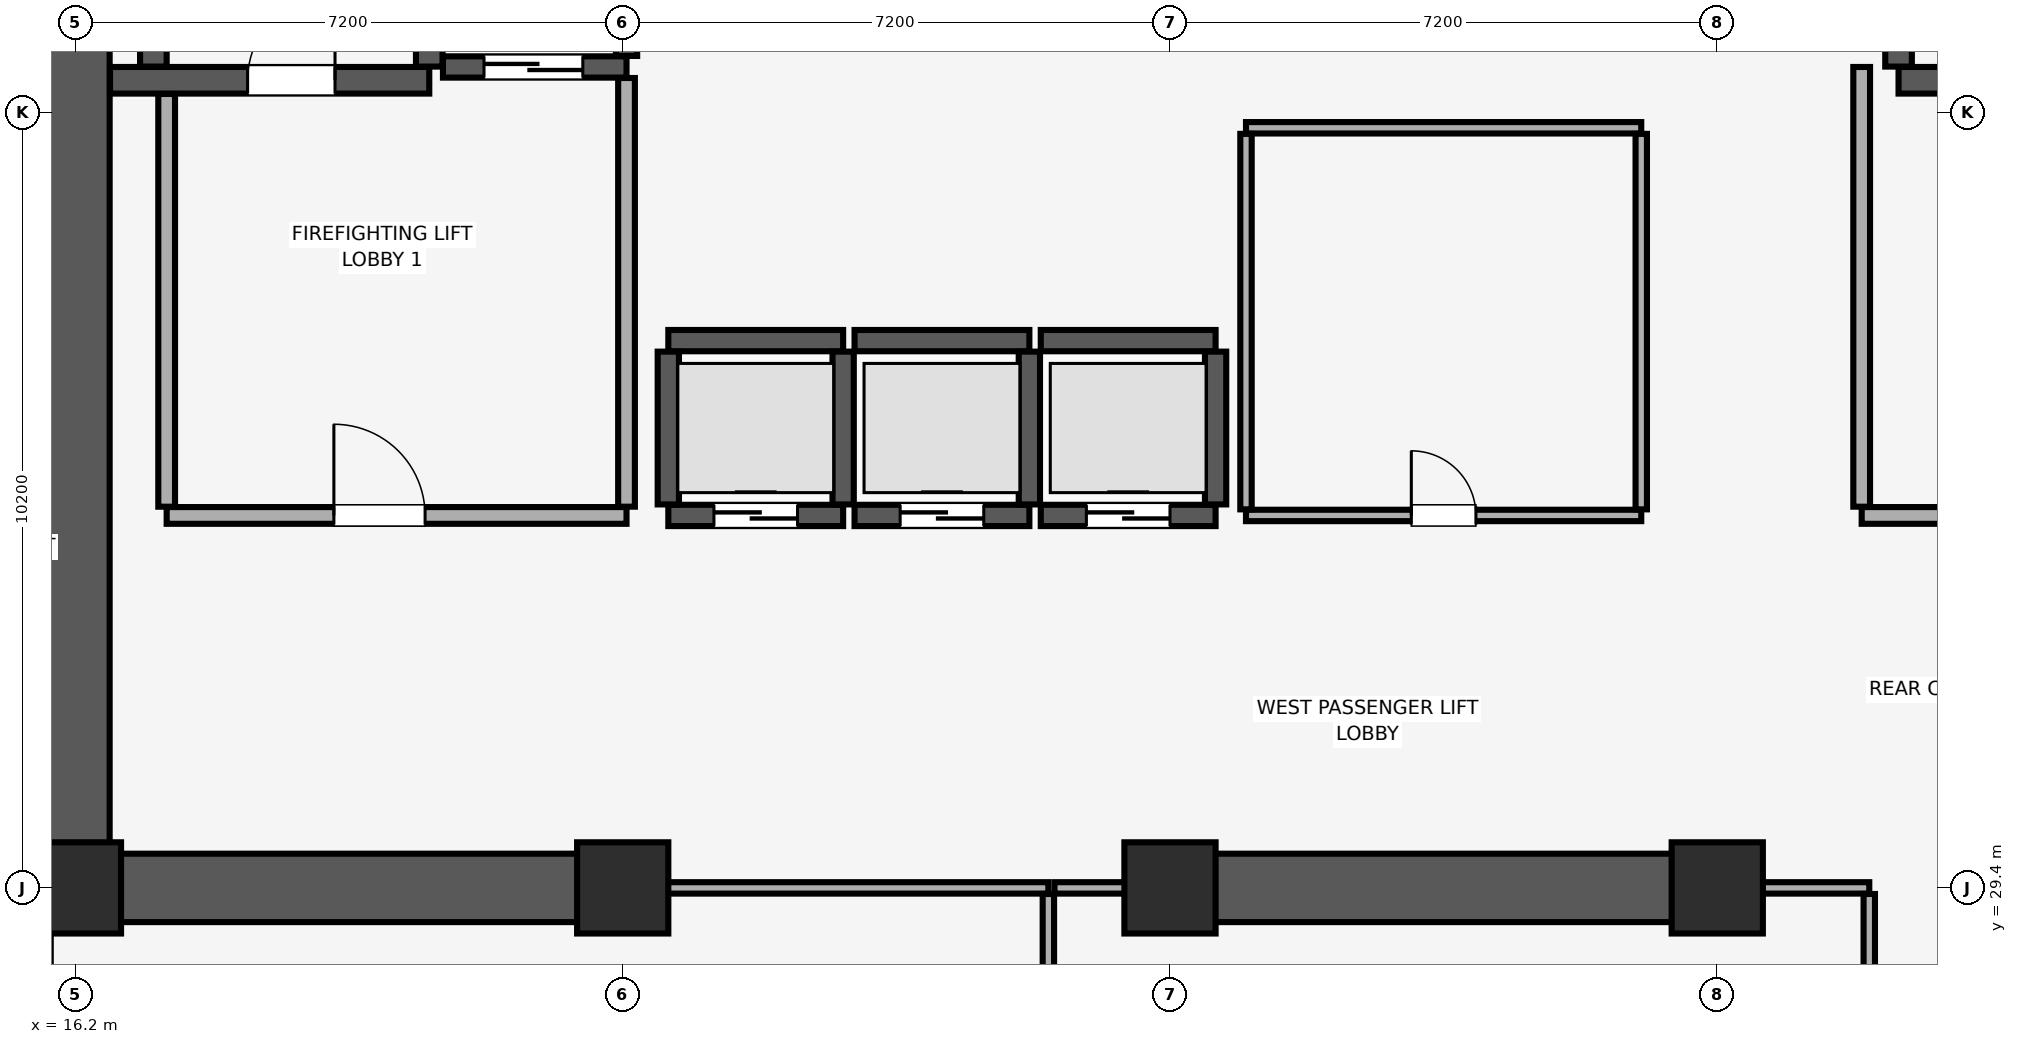
"""IFC4 building model, lengths in metres.
Left out: names, types, materials, properties, quantities, classifications, styles, units other than length and angle.
Written with IfcOpenShell. Run it as: python <this file> out.ifc"""

import sys

from ifc_helpers import new_model, si_unit, direction, frame, frame_2d, origin, origin_2d, place, context, subcontext, project, spatial, rectangle, extrude, element, fill, save


model = new_model("IFC4")
c1 = context("Model", 3, precision=1e-05, world=origin(), true_north=direction((0.0, 1.0)))
c2 = subcontext(c1, "Body", "Model", "MODEL_VIEW")
j1 = project(units=[si_unit("LENGTHUNIT", "METRE"), si_unit("PLANEANGLEUNIT", "RADIAN")], contexts=[c1])
p1 = place(None, origin())
s1 = spatial("IfcSite", under=j1, at=p1, CompositionType="ELEMENT")
p2 = place(p1, origin())
s2 = spatial("IfcBuilding", under=s1, at=p2, CompositionType="ELEMENT")
p3 = place(p2, frame((0.0, 0.0, 104.3)))
s3 = spatial("IfcBuildingStorey", under=s2, at=p3, CompositionType="ELEMENT", Elevation=104.3)
for number, where, z_axis, x_axis in (
    (1, (16.2, 29.4, 0.0), (0.0, 0.0, 1.0), (1.0, 0.0, 0.0)),
    (2, (23.4, 29.4, 0.0), (0.0, 0.0, 1.0), (1.0, 0.0, 0.0)),
    (3, (30.6, 29.4, 0.0), (0.0, 0.0, 1.0), (1.0, 0.0, 0.0)),
    (4, (37.8, 29.4, 0.0), (0.0, 0.0, 1.0), (1.0, 0.0, 0.0)),
):
    element("IfcColumn", number, at=place(p3, frame(where, z_axis=z_axis, x_axis=x_axis)), inside=s3, PredefinedType="COLUMN", context=c2, shape_type="SweptSolid", body=[
        extrude(rectangle(XDim=1.2, YDim=1.2, at=origin_2d()), origin(), (0.0, 0.0, 1.0), 3.51),
    ])
p4 = place(p3, frame((16.2, 29.4, 0.0), z_axis=(0.0, 0.0, 1.0), x_axis=(0.0, 1.0, 0.0)))
e5 = element("IfcWall", 5, at=p4, inside=s3, PredefinedType="SHEAR", context=c2, shape_type="SweptSolid", body=[
    extrude(rectangle(XDim=19.2, YDim=0.9, at=frame_2d((9.6, 0.0))), origin(), (0.0, 0.0, 1.0), 3.51),
])
p5 = place(p3, frame((16.655, 29.4, 0.0), z_axis=(0.0, 0.0, 1.0), x_axis=(1.0, 0.0, 0.0)))
e6 = element("IfcWall", 6, at=p5, inside=s3, PredefinedType="SHEAR", context=c2, shape_type="SweptSolid", body=[
    extrude(rectangle(XDim=6.945, YDim=0.9, at=frame_2d((3.473, 0.0))), origin(), (0.0, 0.0, 1.0), 3.51),
])
p6 = place(p3, frame((30.4, 29.4, 0.0), z_axis=(0.0, 0.0, 1.0), x_axis=(1.0, 0.0, 0.0)))
e7 = element("IfcWall", 7, at=p6, inside=s3, PredefinedType="SHEAR", context=c2, shape_type="SweptSolid", body=[
    extrude(rectangle(XDim=7.6, YDim=0.9, at=frame_2d((3.8, 0.0))), origin(), (0.0, 0.0, 1.0), 3.51),
])
p7 = place(p3, frame((16.655, 40.025, 0.0), z_axis=(0.0, 0.0, 1.0), x_axis=(1.0, 0.0, 0.0)))
e8 = element("IfcWall", 8, at=p7, inside=s3, PredefinedType="SHEAR", context=c2, shape_type="SweptSolid", body=[
    extrude(rectangle(XDim=4.2, YDim=0.35, at=frame_2d((2.1, 0.0))), origin(), (0.0, 0.0, 1.0), 3.51),
])
p8 = place(p7, frame((1.81, 0.0, 0.0)))
e9 = element("IfcOpeningElement", 9, at=p8, cuts=e8, PredefinedType="OPENING", context=c2, shape_type="SweptSolid", body=[
    extrude(rectangle(XDim=1.15, YDim=2.15, at=frame_2d((0.575, 1.075))), frame((0.0, 0.185, 0.0), z_axis=(0.0, -1.0, 0.0), x_axis=(1.0, 0.0, 0.0)), (0.0, 0.0, 1.0), 0.37),
])
for number, where, z_axis, x_axis in (
    (10, (17.225, 40.205, 0.0), (0.0, 0.0, 1.0), (0.0, 1.0, 0.0)),
    (11, (20.855, 40.205, 0.0), (0.0, 0.0, 1.0), (0.0, 1.0, 0.0)),
):
    element("IfcWall", number, at=place(p3, frame(where, z_axis=z_axis, x_axis=x_axis)), inside=s3, PredefinedType="SHEAR", context=c2, shape_type="SweptSolid", body=[
        extrude(rectangle(XDim=8.09, YDim=0.35, at=frame_2d((4.045, 0.0))), origin(), (0.0, 0.0, 1.0), 3.51),
    ])
p9 = place(p3, frame((40.185, 40.025, 0.0), z_axis=(0.0, 0.0, 1.0), x_axis=(1.0, 0.0, 0.0)))
e12 = element("IfcWall", 12, at=p9, inside=s3, PredefinedType="SHEAR", context=c2, shape_type="SweptSolid", body=[
    extrude(rectangle(XDim=3.63, YDim=0.35, at=frame_2d((1.815, 0.0))), origin(), (0.0, 0.0, 1.0), 3.51),
])
p10 = place(p9, frame((1.24, 0.0, 0.0)))
e13 = element("IfcOpeningElement", 13, at=p10, cuts=e12, PredefinedType="OPENING", context=c2, shape_type="SweptSolid", body=[
    extrude(rectangle(XDim=1.15, YDim=2.15, at=frame_2d((0.575, 1.075))), frame((0.0, 0.185, 0.0), z_axis=(0.0, -1.0, 0.0), x_axis=(1.0, 0.0, 0.0)), (0.0, 0.0, 1.0), 0.37),
])
p11 = place(p3, frame((40.185, 40.205, 0.0), z_axis=(0.0, 0.0, 1.0), x_axis=(0.0, 1.0, 0.0)))
e14 = element("IfcWall", 14, at=p11, inside=s3, PredefinedType="SHEAR", context=c2, shape_type="SweptSolid", body=[
    extrude(rectangle(XDim=8.09, YDim=0.35, at=frame_2d((4.045, 0.0))), origin(), (0.0, 0.0, 1.0), 3.51),
])
p12 = place(p3, frame((24.0, 34.3, 0.0), z_axis=(0.0, 0.0, 1.0), x_axis=(1.0, 0.0, 0.0)))
e15 = element("IfcWall", 15, at=p12, inside=s3, PredefinedType="SHEAR", context=c2, shape_type="SweptSolid", body=[
    extrude(rectangle(XDim=2.3, YDim=0.28, at=frame_2d((1.15, 0.0))), origin(), (0.0, 0.0, 1.0), 3.51),
])
p13 = place(p12, frame((0.6, 0.0, 0.0)))
e16 = element("IfcOpeningElement", 16, at=p13, cuts=e15, PredefinedType="OPENING", context=c2, shape_type="SweptSolid", body=[
    extrude(rectangle(XDim=1.1, YDim=2.2, at=frame_2d((0.55, 1.1))), frame((0.0, 0.15, 0.0), z_axis=(0.0, -1.0, 0.0), x_axis=(1.0, 0.0, 0.0)), (0.0, 0.0, 1.0), 0.3),
])
p14 = place(p3, frame((24.0, 36.6, 0.0), z_axis=(0.0, 0.0, 1.0), x_axis=(1.0, 0.0, 0.0)))
e17 = element("IfcWall", 17, at=p14, inside=s3, PredefinedType="SHEAR", context=c2, shape_type="SweptSolid", body=[
    extrude(rectangle(XDim=2.3, YDim=0.28, at=frame_2d((1.15, 0.0))), origin(), (0.0, 0.0, 1.0), 3.51),
])
for number, where, z_axis, x_axis in (
    (18, (24.0, 34.445, 0.0), (0.0, 0.0, 1.0), (0.0, 1.0, 0.0)),
    (19, (26.3, 34.445, 0.0), (0.0, 0.0, 1.0), (0.0, 1.0, 0.0)),
):
    element("IfcWall", number, at=place(p3, frame(where, z_axis=z_axis, x_axis=x_axis)), inside=s3, PredefinedType="SHEAR", context=c2, shape_type="SweptSolid", body=[
        extrude(rectangle(XDim=2.01, YDim=0.28, at=frame_2d((1.005, 0.0))), origin(), (0.0, 0.0, 1.0), 3.51),
    ])
p15 = place(p3, frame((26.45, 34.3, 0.0), z_axis=(0.0, 0.0, 1.0), x_axis=(1.0, 0.0, 0.0)))
e20 = element("IfcWall", 20, at=p15, inside=s3, PredefinedType="SHEAR", context=c2, shape_type="SweptSolid", body=[
    extrude(rectangle(XDim=2.3, YDim=0.28, at=frame_2d((1.15, 0.0))), origin(), (0.0, 0.0, 1.0), 3.51),
])
p16 = place(p15, frame((0.6, 0.0, 0.0)))
e21 = element("IfcOpeningElement", 21, at=p16, cuts=e20, PredefinedType="OPENING", context=c2, shape_type="SweptSolid", body=[
    extrude(rectangle(XDim=1.1, YDim=2.2, at=frame_2d((0.55, 1.1))), frame((0.0, 0.15, 0.0), z_axis=(0.0, -1.0, 0.0), x_axis=(1.0, 0.0, 0.0)), (0.0, 0.0, 1.0), 0.3),
])
p17 = place(p3, frame((26.45, 36.6, 0.0), z_axis=(0.0, 0.0, 1.0), x_axis=(1.0, 0.0, 0.0)))
e22 = element("IfcWall", 22, at=p17, inside=s3, PredefinedType="SHEAR", context=c2, shape_type="SweptSolid", body=[
    extrude(rectangle(XDim=2.3, YDim=0.28, at=frame_2d((1.15, 0.0))), origin(), (0.0, 0.0, 1.0), 3.51),
])
p18 = place(p3, frame((28.75, 34.445, 0.0), z_axis=(0.0, 0.0, 1.0), x_axis=(0.0, 1.0, 0.0)))
e23 = element("IfcWall", 23, at=p18, inside=s3, PredefinedType="SHEAR", context=c2, shape_type="SweptSolid", body=[
    extrude(rectangle(XDim=2.01, YDim=0.28, at=frame_2d((1.005, 0.0))), origin(), (0.0, 0.0, 1.0), 3.51),
])
p19 = place(p3, frame((28.9, 34.3, 0.0), z_axis=(0.0, 0.0, 1.0), x_axis=(1.0, 0.0, 0.0)))
e24 = element("IfcWall", 24, at=p19, inside=s3, PredefinedType="SHEAR", context=c2, shape_type="SweptSolid", body=[
    extrude(rectangle(XDim=2.3, YDim=0.28, at=frame_2d((1.15, 0.0))), origin(), (0.0, 0.0, 1.0), 3.51),
])
p20 = place(p19, frame((0.6, 0.0, 0.0)))
e25 = element("IfcOpeningElement", 25, at=p20, cuts=e24, PredefinedType="OPENING", context=c2, shape_type="SweptSolid", body=[
    extrude(rectangle(XDim=1.1, YDim=2.2, at=frame_2d((0.55, 1.1))), frame((0.0, 0.15, 0.0), z_axis=(0.0, -1.0, 0.0), x_axis=(1.0, 0.0, 0.0)), (0.0, 0.0, 1.0), 0.3),
])
p21 = place(p3, frame((28.9, 36.6, 0.0), z_axis=(0.0, 0.0, 1.0), x_axis=(1.0, 0.0, 0.0)))
e26 = element("IfcWall", 26, at=p21, inside=s3, PredefinedType="SHEAR", context=c2, shape_type="SweptSolid", body=[
    extrude(rectangle(XDim=2.3, YDim=0.28, at=frame_2d((1.15, 0.0))), origin(), (0.0, 0.0, 1.0), 3.51),
])
p22 = place(p3, frame((31.2, 34.445, 0.0), z_axis=(0.0, 0.0, 1.0), x_axis=(0.0, 1.0, 0.0)))
e27 = element("IfcWall", 27, at=p22, inside=s3, PredefinedType="SHEAR", context=c2, shape_type="SweptSolid", body=[
    extrude(rectangle(XDim=2.01, YDim=0.28, at=frame_2d((1.005, 0.0))), origin(), (0.0, 0.0, 1.0), 3.51),
])
p23 = place(p3, frame((21.035, 40.2, 0.0), z_axis=(0.0, 0.0, 1.0), x_axis=(1.0, 0.0, 0.0)))
e28 = element("IfcWall", 28, at=p23, inside=s3, PredefinedType="SHEAR", context=c2, shape_type="SweptSolid", body=[
    extrude(rectangle(XDim=2.415, YDim=0.28, at=frame_2d((1.208, 0.0))), origin(), (0.0, 0.0, 1.0), 3.51),
])
p24 = place(p23, frame((0.54, 0.0, 0.0)))
e29 = element("IfcOpeningElement", 29, at=p24, cuts=e28, PredefinedType="OPENING", context=c2, shape_type="SweptSolid", body=[
    extrude(rectangle(XDim=1.3, YDim=2.3, at=frame_2d((0.65, 1.15))), frame((0.0, 0.15, 0.0), z_axis=(0.0, -1.0, 0.0), x_axis=(1.0, 0.0, 0.0)), (0.0, 0.0, 1.0), 0.3),
])
p25 = place(p3, frame((23.45, 40.345, 0.0), z_axis=(0.0, 0.0, 1.0), x_axis=(0.0, 1.0, 0.0)))
e30 = element("IfcWall", 30, at=p25, inside=s3, PredefinedType="SHEAR", context=c2, shape_type="SweptSolid", body=[
    extrude(rectangle(XDim=2.81, YDim=0.28, at=frame_2d((1.405, 0.0))), origin(), (0.0, 0.0, 1.0), 3.51),
])
p26 = place(p3, frame((17.4, 34.3, 0.0), z_axis=(0.0, 0.0, 1.0), x_axis=(1.0, 0.0, 0.0)))
e31 = element("IfcWall", 31, at=p26, inside=s3, PredefinedType="PARTITIONING", context=c2, shape_type="SweptSolid", body=[
    extrude(rectangle(XDim=6.05, YDim=0.22, at=frame_2d((3.025, 0.0))), origin(), (0.0, 0.0, 1.0), 3.51),
])
p27 = place(p26, frame((2.2, 0.0, 0.0)))
e32 = element("IfcOpeningElement", 32, at=p27, cuts=e31, PredefinedType="OPENING", context=c2, shape_type="SweptSolid", body=[
    extrude(rectangle(XDim=1.2, YDim=2.15, at=frame_2d((0.6, 1.075))), frame((0.0, 0.12, 0.0), z_axis=(0.0, -1.0, 0.0), x_axis=(1.0, 0.0, 0.0)), (0.0, 0.0, 1.0), 0.24),
])
p28 = place(p3, frame((17.4, 34.415, 0.0), z_axis=(0.0, 0.0, 1.0), x_axis=(0.0, 1.0, 0.0)))
e33 = element("IfcWall", 33, at=p28, inside=s3, PredefinedType="PARTITIONING", context=c2, shape_type="SweptSolid", body=[
    extrude(rectangle(XDim=5.43, YDim=0.22, at=frame_2d((2.715, 0.0))), origin(), (0.0, 0.0, 1.0), 3.51),
])
p29 = place(p3, frame((23.45, 34.415, 0.0), z_axis=(0.0, 0.0, 1.0), x_axis=(0.0, 1.0, 0.0)))
e34 = element("IfcWall", 34, at=p29, inside=s3, PredefinedType="PARTITIONING", context=c2, shape_type="SweptSolid", body=[
    extrude(rectangle(XDim=5.64, YDim=0.22, at=frame_2d((2.82, 0.0))), origin(), (0.0, 0.0, 1.0), 3.51),
])
p30 = place(p3, frame((39.7, 34.3, 0.0), z_axis=(0.0, 0.0, 1.0), x_axis=(1.0, 0.0, 0.0)))
e35 = element("IfcWall", 35, at=p30, inside=s3, PredefinedType="PARTITIONING", context=c2, shape_type="SweptSolid", body=[
    extrude(rectangle(XDim=4.6, YDim=0.22, at=frame_2d((2.3, 0.0))), origin(), (0.0, 0.0, 1.0), 3.51),
])
p31 = place(p30, frame((1.7, 0.0, 0.0)))
e36 = element("IfcOpeningElement", 36, at=p31, cuts=e35, PredefinedType="OPENING", context=c2, shape_type="SweptSolid", body=[
    extrude(rectangle(XDim=1.2, YDim=2.15, at=frame_2d((0.6, 1.075))), frame((0.0, 0.12, 0.0), z_axis=(0.0, -1.0, 0.0), x_axis=(1.0, 0.0, 0.0)), (0.0, 0.0, 1.0), 0.24),
])
p32 = place(p3, frame((39.7, 34.415, 0.0), z_axis=(0.0, 0.0, 1.0), x_axis=(0.0, 1.0, 0.0)))
e37 = element("IfcWall", 37, at=p32, inside=s3, PredefinedType="PARTITIONING", context=c2, shape_type="SweptSolid", body=[
    extrude(rectangle(XDim=5.785, YDim=0.22, at=frame_2d((2.893, 0.0))), origin(), (0.0, 0.0, 1.0), 3.51),
])
p33 = place(p3, frame((31.6, 34.3, 0.0), z_axis=(0.0, 0.0, 1.0), x_axis=(1.0, 0.0, 0.0)))
e38 = element("IfcWall", 38, at=p33, inside=s3, PredefinedType="PARTITIONING", context=c2, shape_type="SweptSolid", body=[
    extrude(rectangle(XDim=5.2, YDim=0.15, at=frame_2d((2.6, 0.0))), origin(), (0.0, 0.0, 1.0), 3.51),
])
p34 = place(p33, frame((2.175, 0.0, 0.0)))
e39 = element("IfcOpeningElement", 39, at=p34, cuts=e38, PredefinedType="OPENING", context=c2, shape_type="SweptSolid", body=[
    extrude(rectangle(XDim=0.85, YDim=2.1, at=frame_2d((0.425, 1.05))), frame((0.0, 0.085, 0.0), z_axis=(0.0, -1.0, 0.0), x_axis=(1.0, 0.0, 0.0)), (0.0, 0.0, 1.0), 0.17),
])
p35 = place(p3, frame((31.6, 39.4, 0.0), z_axis=(0.0, 0.0, 1.0), x_axis=(1.0, 0.0, 0.0)))
e40 = element("IfcWall", 40, at=p35, inside=s3, PredefinedType="PARTITIONING", context=c2, shape_type="SweptSolid", body=[
    extrude(rectangle(XDim=5.2, YDim=0.15, at=frame_2d((2.6, 0.0))), origin(), (0.0, 0.0, 1.0), 3.51),
])
for number, where, z_axis, x_axis in (
    (41, (31.6, 34.38, 0.0), (0.0, 0.0, 1.0), (0.0, 1.0, 0.0)),
    (42, (36.8, 34.38, 0.0), (0.0, 0.0, 1.0), (0.0, 1.0, 0.0)),
):
    element("IfcWall", number, at=place(p3, frame(where, z_axis=z_axis, x_axis=x_axis)), inside=s3, PredefinedType="PARTITIONING", context=c2, shape_type="SweptSolid", body=[
        extrude(rectangle(XDim=4.94, YDim=0.15, at=frame_2d((2.47, 0.0))), origin(), (0.0, 0.0, 1.0), 3.51),
    ])
p36 = place(p3, frame((23.61, 29.4, 0.0), z_axis=(0.0, 0.0, 1.0), x_axis=(1.0, 0.0, 0.0)))
e43 = element("IfcWall", 43, at=p36, inside=s3, PredefinedType="PARTITIONING", context=c2, shape_type="SweptSolid", body=[
    extrude(rectangle(XDim=5.39, YDim=0.15, at=frame_2d((2.695, 0.0))), origin(), (0.0, 0.0, 1.0), 2.41),
])
p37 = place(p3, frame((29.0, 23.93, 0.0), z_axis=(0.0, 0.0, 1.0), x_axis=(0.0, 1.0, 0.0)))
e44 = element("IfcWall", 44, at=p37, inside=s3, PredefinedType="PARTITIONING", context=c2, shape_type="SweptSolid", body=[
    extrude(rectangle(XDim=5.39, YDim=0.15, at=frame_2d((2.695, 0.0))), origin(), (0.0, 0.0, 1.0), 3.51),
])
p38 = place(p3, frame((29.08, 29.4, 0.0), z_axis=(0.0, 0.0, 1.0), x_axis=(1.0, 0.0, 0.0)))
e45 = element("IfcWall", 45, at=p38, inside=s3, PredefinedType="PARTITIONING", context=c2, shape_type="SweptSolid", body=[
    extrude(rectangle(XDim=1.31, YDim=0.15, at=frame_2d((0.655, 0.0))), origin(), (0.0, 0.0, 1.0), 2.41),
])
p39 = place(p3, frame((38.01, 29.4, 0.0), z_axis=(0.0, 0.0, 1.0), x_axis=(1.0, 0.0, 0.0)))
e46 = element("IfcWall", 46, at=p39, inside=s3, PredefinedType="PARTITIONING", context=c2, shape_type="SweptSolid", body=[
    extrude(rectangle(XDim=1.79, YDim=0.15, at=frame_2d((0.895, 0.0))), origin(), (0.0, 0.0, 1.0), 2.41),
])
p40 = place(p3, frame((39.8, 23.93, 0.0), z_axis=(0.0, 0.0, 1.0), x_axis=(0.0, 1.0, 0.0)))
e47 = element("IfcWall", 47, at=p40, inside=s3, PredefinedType="PARTITIONING", context=c2, shape_type="SweptSolid", body=[
    extrude(rectangle(XDim=5.39, YDim=0.15, at=frame_2d((2.695, 0.0))), origin(), (0.0, 0.0, 1.0), 3.51),
])
p41 = place(p8, origin())
e48 = element("IfcDoor", 48, at=p41, inside=s3, OperationType="SINGLE_SWING_RIGHT", PredefinedType="DOOR", context=c2, shape_type="SweptSolid", body=[
    extrude(rectangle(XDim=1.15, YDim=2.15, at=frame_2d((0.575, 1.075))), frame((0.0, 0.025, 0.0), z_axis=(0.0, -1.0, 0.0), x_axis=(1.0, 0.0, 0.0)), (0.0, 0.0, 1.0), 0.05),
])
fill(e9, e48)
p42 = place(p13, origin())
e49 = element("IfcDoor", 49, at=p42, inside=s3, OperationType="DOUBLE_DOOR_SLIDING", PredefinedType="DOOR", context=c2, shape_type="SweptSolid", body=[
    extrude(rectangle(XDim=1.1, YDim=2.2, at=frame_2d((0.55, 1.1))), frame((0.0, 0.025, 0.0), z_axis=(0.0, -1.0, 0.0), x_axis=(1.0, 0.0, 0.0)), (0.0, 0.0, 1.0), 0.05),
])
fill(e16, e49)
p43 = place(p16, origin())
e50 = element("IfcDoor", 50, at=p43, inside=s3, OperationType="DOUBLE_DOOR_SLIDING", PredefinedType="DOOR", context=c2, shape_type="SweptSolid", body=[
    extrude(rectangle(XDim=1.1, YDim=2.2, at=frame_2d((0.55, 1.1))), frame((0.0, 0.025, 0.0), z_axis=(0.0, -1.0, 0.0), x_axis=(1.0, 0.0, 0.0)), (0.0, 0.0, 1.0), 0.05),
])
fill(e21, e50)
p44 = place(p20, origin())
e51 = element("IfcDoor", 51, at=p44, inside=s3, OperationType="DOUBLE_DOOR_SLIDING", PredefinedType="DOOR", context=c2, shape_type="SweptSolid", body=[
    extrude(rectangle(XDim=1.1, YDim=2.2, at=frame_2d((0.55, 1.1))), frame((0.0, 0.025, 0.0), z_axis=(0.0, -1.0, 0.0), x_axis=(1.0, 0.0, 0.0)), (0.0, 0.0, 1.0), 0.05),
])
fill(e25, e51)
p45 = place(p24, origin())
e52 = element("IfcDoor", 52, at=p45, inside=s3, OperationType="DOUBLE_DOOR_SLIDING", PredefinedType="DOOR", context=c2, shape_type="SweptSolid", body=[
    extrude(rectangle(XDim=1.3, YDim=2.3, at=frame_2d((0.65, 1.15))), frame((0.0, 0.025, 0.0), z_axis=(0.0, -1.0, 0.0), x_axis=(1.0, 0.0, 0.0)), (0.0, 0.0, 1.0), 0.05),
])
fill(e29, e52)
p46 = place(p27, origin())
e53 = element("IfcDoor", 53, at=p46, inside=s3, OperationType="SINGLE_SWING_LEFT", PredefinedType="DOOR", context=c2, shape_type="SweptSolid", body=[
    extrude(rectangle(XDim=1.2, YDim=2.15, at=frame_2d((0.6, 1.075))), frame((0.0, 0.025, 0.0), z_axis=(0.0, -1.0, 0.0), x_axis=(1.0, 0.0, 0.0)), (0.0, 0.0, 1.0), 0.05),
])
fill(e32, e53)
p47 = place(p34, origin())
e54 = element("IfcDoor", 54, at=p47, inside=s3, OperationType="SINGLE_SWING_LEFT", PredefinedType="DOOR", context=c2, shape_type="SweptSolid", body=[
    extrude(rectangle(XDim=0.85, YDim=2.1, at=frame_2d((0.425, 1.05))), frame((0.0, 0.025, 0.0), z_axis=(0.0, -1.0, 0.0), x_axis=(1.0, 0.0, 0.0)), (0.0, 0.0, 1.0), 0.05),
])
fill(e39, e54)
save(model, sys.argv[1])
